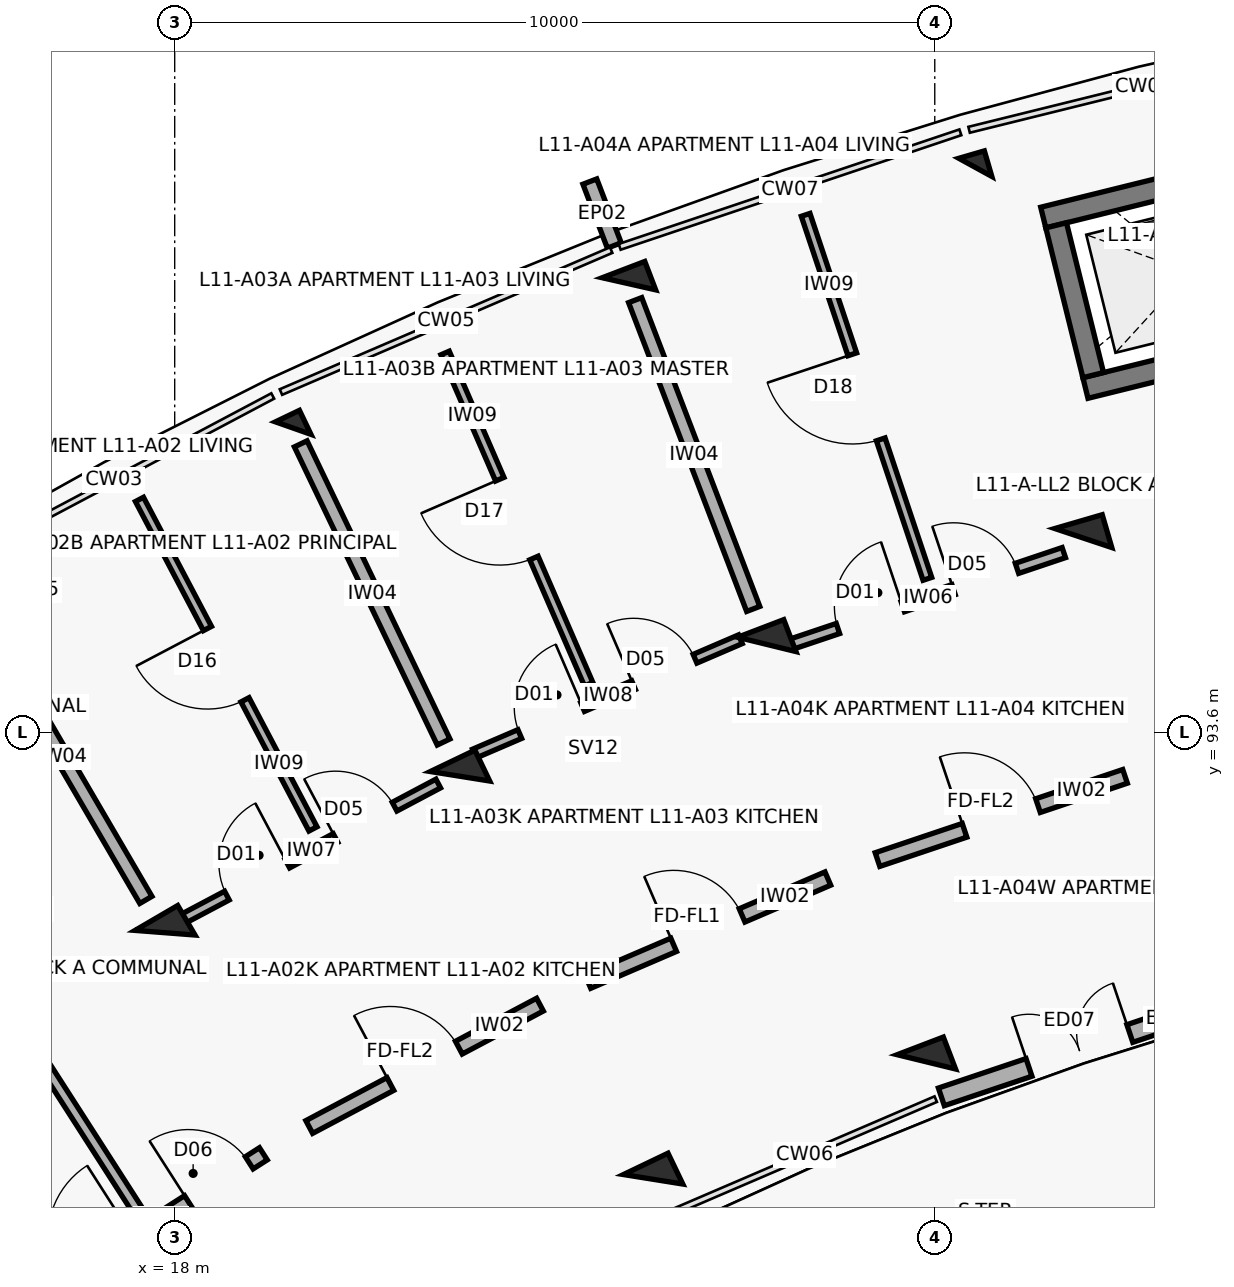
"""IFC4 building model, lengths in metres.
Left out: names, types, materials, properties, quantities, classifications, styles, units other than length and angle.
Written with IfcOpenShell. Run it as: python <this file> out.ifc"""

import sys

from ifc_helpers import new_model, si_unit, direction, frame, frame_2d, origin, origin_2d, place, context, subcontext, project, spatial, rectangle, extrude, element, fill, save


model = new_model("IFC4")
c1 = context("Model", 3, precision=1e-05, world=origin(), true_north=direction((0.0, 1.0)))
c2 = subcontext(c1, "Body", "Model", "MODEL_VIEW")
j1 = project(units=[si_unit("LENGTHUNIT", "METRE"), si_unit("PLANEANGLEUNIT", "RADIAN")], contexts=[c1])
p1 = place(None, origin())
s1 = spatial("IfcSite", under=j1, at=p1, CompositionType="ELEMENT")
p2 = place(p1, origin())
s2 = spatial("IfcBuilding", under=s1, at=p2, CompositionType="ELEMENT")
p3 = place(p2, frame((0.0, 0.0, 36.0)))
s3 = spatial("IfcBuildingStorey", under=s2, at=p3, CompositionType="ELEMENT", Elevation=36.0)
for number, where, z_axis, x_axis in (
    (1, (17.873, 90.96, 0.0), (0.0, 0.0, 1.0), (-0.504, 0.864, 0.0)),
    (2, (24.294, 87.716, 0.0), (0.0, 0.0, 1.0), (-0.432, 0.902, 0.0)),
    (3, (21.754, 93.019, 0.0), (0.0, 0.0, 1.0), (-0.432, 0.902, 0.0)),
):
    element("IfcColumn", number, at=place(p3, frame(where, z_axis=z_axis, x_axis=x_axis)), inside=s3, PredefinedType="COLUMN", context=c2, shape_type="SweptSolid", body=[
        extrude(rectangle(XDim=0.45, YDim=0.65, at=origin_2d()), origin(), (0.0, 0.0, 1.0), 3.1),
    ])
p4 = place(p3, frame((19.559, 97.6, 0.0), z_axis=(0.0, 0.0, 1.0), x_axis=(-0.432085748802, 0.901832526405, 0.0)))
e4 = element("IfcColumn", 4, at=p4, inside=s3, PredefinedType="COLUMN", context=c2, shape_type="SweptSolid", body=[
    extrude(rectangle(XDim=0.35, YDim=0.35, at=origin_2d()), origin(), (0.0, 0.0, 1.0), 3.1),
])
for number, where, z_axis, x_axis in (
    (5, (27.889, 89.261, 0.0), (0.0, 0.0, 1.0), (-0.357, 0.934, 0.0)),
    (6, (25.79, 94.753, 0.0), (0.0, 0.0, 1.0), (-0.357, 0.934, 0.0)),
):
    element("IfcColumn", number, at=place(p3, frame(where, z_axis=z_axis, x_axis=x_axis)), inside=s3, PredefinedType="COLUMN", context=c2, shape_type="SweptSolid", body=[
        extrude(rectangle(XDim=0.45, YDim=0.65, at=origin_2d()), origin(), (0.0, 0.0, 1.0), 3.1),
    ])
p5 = place(p3, frame((23.976, 99.499, 0.0), z_axis=(0.0, 0.0, 1.0), x_axis=(-0.357064076459, 0.934079892355, 0.0)))
e7 = element("IfcColumn", 7, at=p5, inside=s3, PredefinedType="COLUMN", context=c2, shape_type="SweptSolid", body=[
    extrude(rectangle(XDim=0.4, YDim=0.6, at=origin_2d()), origin(), (0.0, 0.0, 1.0), 3.1),
])
p6 = place(p3, frame((29.954, 96.153, 0.0), z_axis=(0.0, 0.0, 1.0), x_axis=(-0.27966144946, 0.96009867914, 0.0)))
e8 = element("IfcColumn", 8, at=p6, inside=s3, PredefinedType="COLUMN", context=c2, shape_type="SweptSolid", body=[
    extrude(rectangle(XDim=0.45, YDim=0.65, at=origin_2d()), origin(), (0.0, 0.0, 1.0), 3.1),
])
p7 = place(p3, frame((28.533, 101.031, 0.0), z_axis=(0.0, 0.0, 1.0), x_axis=(-0.27966144946, 0.96009867914, 0.0)))
e9 = element("IfcColumn", 9, at=p7, inside=s3, PredefinedType="COLUMN", context=c2, shape_type="SweptSolid", body=[
    extrude(rectangle(XDim=0.35, YDim=0.35, at=origin_2d()), origin(), (0.0, 0.0, 1.0), 3.1),
])
p8 = place(p3, frame((23.783, 100.003, 0.0), z_axis=(0.0, 0.0, 1.0), x_axis=(-0.356942580168, 0.934126326823, 0.0)))
e10 = element("IfcWall", 10, at=p8, inside=s3, PredefinedType="PARAPET", context=c2, shape_type="SweptSolid", body=[
    extrude(rectangle(XDim=0.9, YDim=0.195, at=frame_2d((0.45, 0.0))), origin(), (0.0, 0.0, 1.0), 2.25),
])
p9 = place(p3, frame((28.087, 88.801, 0.0), z_axis=(0.0, 0.0, 1.0), x_axis=(0.947890376231, 0.318596664529, 0.0)))
e11 = element("IfcWall", 11, at=p9, inside=s3, PredefinedType="SOLIDWALL", context=c2, shape_type="SweptSolid", body=[
    extrude(rectangle(XDim=3.832, YDim=0.245, at=frame_2d((1.916, 0.0))), origin(), (0.0, 0.0, 1.0), 2.25),
])
p10 = place(p9, frame((1.216, 0.0, 0.0)))
e12 = element("IfcOpeningElement", 12, at=p10, cuts=e11, PredefinedType="OPENING", context=c2, shape_type="SweptSolid", body=[
    extrude(rectangle(XDim=1.4, YDim=2.15, at=frame_2d((0.7, 1.075))), frame((0.0, 0.133, 0.0), z_axis=(0.0, -1.0, 0.0), x_axis=(1.0, 0.0, 0.0)), (0.0, 0.0, 1.0), 0.265),
])
p11 = place(p3, frame((25.763, 84.65, 0.0), z_axis=(0.0, 0.0, 1.0), x_axis=(0.941178218484, 0.337910581443, 0.0)))
e13 = element("IfcWall", 13, at=p11, inside=s3, PredefinedType="PARAPET", context=c2, shape_type="SweptSolid", body=[
    extrude(rectangle(XDim=9.075, YDim=0.18, at=frame_2d((4.538, 0.0))), origin(), (0.0, 0.0, 1.0), 0.25),
])
p12 = place(p3, frame((33.273, 98.942, 0.0), z_axis=(0.0, 0.0, 1.0), x_axis=(-0.970707542441, -0.240264160972, 0.0)))
e14 = element("IfcWall", 14, at=p12, inside=s3, PredefinedType="SHEAR", context=c2, shape_type="SweptSolid", body=[
    extrude(rectangle(XDim=3.39, YDim=0.28, at=frame_2d((1.695, 0.0))), origin(), (0.0, 0.0, 1.0), 3.1),
])
p13 = place(p12, frame((1.095, 0.0, 0.0)))
e15 = element("IfcOpeningElement", 15, at=p13, cuts=e14, PredefinedType="OPENING", context=c2, shape_type="SweptSolid", body=[
    extrude(rectangle(XDim=1.2, YDim=2.15, at=frame_2d((0.6, 1.075))), frame((0.0, 0.15, 0.0), z_axis=(0.0, -1.0, 0.0), x_axis=(1.0, 0.0, 0.0)), (0.0, 0.0, 1.0), 0.3),
])
p14 = place(p3, frame((32.718, 101.185, 0.0), z_axis=(0.0, 0.0, 1.0), x_axis=(-0.970711699588, -0.240247364777, 0.0)))
e16 = element("IfcWall", 16, at=p14, inside=s3, PredefinedType="SHEAR", context=c2, shape_type="SweptSolid", body=[
    extrude(rectangle(XDim=3.39, YDim=0.28, at=frame_2d((1.695, 0.0))), origin(), (0.0, 0.0, 1.0), 3.1),
])
p15 = place(p3, frame((30.085, 98.297, 0.0), z_axis=(0.0, 0.0, 1.0), x_axis=(-0.2402993748, 0.970698825832, 0.0)))
e17 = element("IfcWall", 17, at=p15, inside=s3, PredefinedType="SHEAR", context=c2, shape_type="SweptSolid", body=[
    extrude(rectangle(XDim=2.03, YDim=0.28, at=frame_2d((1.015, 0.0))), origin(), (0.0, 0.0, 1.0), 3.1),
])
p16 = place(p3, frame((16.272, 86.199, 0.0), z_axis=(0.0, 0.0, 1.0), x_axis=(0.842257205985, 0.539075874963, 0.0)))
e18 = element("IfcWall", 18, at=p16, inside=s3, PredefinedType="SOLIDWALL", context=c2, shape_type="SweptSolid", body=[
    extrude(rectangle(XDim=3.436, YDim=0.19, at=frame_2d((1.718, 0.0))), origin(), (0.0, 0.0, 1.0), 2.08),
])
p17 = place(p16, frame((0.28, 0.0, 0.0)))
e19 = element("IfcOpeningElement", 19, at=p17, cuts=e18, PredefinedType="OPENING", context=c2, shape_type="SweptSolid", body=[
    extrude(rectangle(XDim=1.12, YDim=2.15, at=frame_2d((0.56, 1.075))), frame((0.0, 0.105, 0.0), z_axis=(0.0, -1.0, 0.0), x_axis=(1.0, 0.0, 0.0)), (0.0, 0.0, 1.0), 0.21),
])
p18 = place(p16, frame((2.266, 0.0, 0.0)))
e20 = element("IfcOpeningElement", 20, at=p18, cuts=e18, PredefinedType="OPENING", context=c2, shape_type="SweptSolid", body=[
    extrude(rectangle(XDim=0.95, YDim=2.1, at=frame_2d((0.475, 1.05))), frame((0.0, 0.105, 0.0), z_axis=(0.0, -1.0, 0.0), x_axis=(1.0, 0.0, 0.0)), (0.0, 0.0, 1.0), 0.21),
])
p19 = place(p3, frame((17.524, 87.288, 0.0), z_axis=(0.0, 0.0, 1.0), x_axis=(-0.540338452216, 0.841447774408, 0.0)))
e21 = element("IfcWall", 21, at=p19, inside=s3, PredefinedType="PARTITIONING", context=c2, shape_type="SweptSolid", body=[
    extrude(rectangle(XDim=7.95, YDim=0.14, at=frame_2d((3.975, 0.0))), origin(), (0.0, 0.0, 1.0), 2.08),
])
p20 = place(p19, frame((6.05, 0.0, 0.0)))
e22 = element("IfcOpeningElement", 22, at=p20, cuts=e21, PredefinedType="OPENING", context=c2, shape_type="SweptSolid", body=[
    extrude(rectangle(XDim=0.92, YDim=2.1, at=frame_2d((0.46, 1.05))), frame((0.0, 0.08, 0.0), z_axis=(0.0, -1.0, 0.0), x_axis=(1.0, 0.0, 0.0)), (0.0, 0.0, 1.0), 0.16),
])
p21 = place(p3, frame((19.77, 88.404, 0.0), z_axis=(0.0, 0.0, 1.0), x_axis=(0.883410853063, 0.468599258099, 0.0)))
e23 = element("IfcWall", 23, at=p21, inside=s3, PredefinedType="SOLIDWALL", context=c2, shape_type="SweptSolid", body=[
    extrude(rectangle(XDim=3.436, YDim=0.19, at=frame_2d((1.718, 0.0))), origin(), (0.0, 0.0, 1.0), 2.08),
])
p22 = place(p21, frame((1.208, 0.0, 0.0)))
e24 = element("IfcOpeningElement", 24, at=p22, cuts=e23, PredefinedType="OPENING", context=c2, shape_type="SweptSolid", body=[
    extrude(rectangle(XDim=1.02, YDim=2.15, at=frame_2d((0.51, 1.075))), frame((0.0, 0.105, 0.0), z_axis=(0.0, -1.0, 0.0), x_axis=(1.0, 0.0, 0.0)), (0.0, 0.0, 1.0), 0.21),
])
p23 = place(p3, frame((18.113, 91.144, 0.0), z_axis=(0.0, 0.0, 1.0), x_axis=(0.88341855112, 0.46858474531, 0.0)))
e25 = element("IfcWall", 25, at=p23, inside=s3, PredefinedType="PARTITIONING", context=c2, shape_type="SweptSolid", body=[
    extrude(rectangle(XDim=3.797, YDim=0.13, at=frame_2d((1.898, 0.0))), origin(), (0.0, 0.0, 1.0), 2.08),
])
p24 = place(p23, frame((0.65, 0.0, 0.0)))
e26 = element("IfcOpeningElement", 26, at=p24, cuts=e25, PredefinedType="OPENING", context=c2, shape_type="SweptSolid", body=[
    extrude(rectangle(XDim=0.9, YDim=2.1, at=frame_2d((0.45, 1.05))), frame((0.0, 0.075, 0.0), z_axis=(0.0, -1.0, 0.0), x_axis=(1.0, 0.0, 0.0)), (0.0, 0.0, 1.0), 0.15),
])
p25 = place(p23, frame((2.267, 0.0, 0.0)))
e27 = element("IfcOpeningElement", 27, at=p25, cuts=e25, PredefinedType="OPENING", context=c2, shape_type="SweptSolid", body=[
    extrude(rectangle(XDim=0.88, YDim=2.1, at=frame_2d((0.44, 1.05))), frame((0.0, 0.075, 0.0), z_axis=(0.0, -1.0, 0.0), x_axis=(1.0, 0.0, 0.0)), (0.0, 0.0, 1.0), 0.15),
])
p26 = place(p3, frame((19.819, 92.326, 0.0), z_axis=(0.0, 0.0, 1.0), x_axis=(-0.465849102717, 0.884864177995, 0.0)))
e28 = element("IfcWall", 28, at=p26, inside=s3, PredefinedType="PARTITIONING", context=c2, shape_type="SweptSolid", body=[
    extrude(rectangle(XDim=4.9, YDim=0.12, at=frame_2d((2.45, 0.0))), origin(), (0.0, 0.0, 1.0), 2.08),
])
p27 = place(p26, frame((1.92, 0.0, 0.0)))
e29 = element("IfcOpeningElement", 29, at=p27, cuts=e28, PredefinedType="OPENING", context=c2, shape_type="SweptSolid", body=[
    extrude(rectangle(XDim=1.06, YDim=2.1, at=frame_2d((0.53, 1.05))), frame((0.0, 0.07, 0.0), z_axis=(0.0, -1.0, 0.0), x_axis=(1.0, 0.0, 0.0)), (0.0, 0.0, 1.0), 0.14),
])
p28 = place(p3, frame((17.621, 91.392, 0.0), z_axis=(0.0, 0.0, 1.0), x_axis=(-0.504216452091, 0.863577309475, 0.0)))
e30 = element("IfcWall", 30, at=p28, inside=s3, PredefinedType="SOLIDWALL", context=c2, shape_type="SweptSolid", body=[
    extrude(rectangle(XDim=4.35, YDim=0.185, at=frame_2d((2.175, 0.0))), origin(), (0.0, 0.0, 1.0), 2.08),
])
p29 = place(p3, frame((23.437, 90.316, 0.0), z_axis=(0.0, 0.0, 1.0), x_axis=(0.918718172399, 0.394913813008, 0.0)))
e31 = element("IfcWall", 31, at=p29, inside=s3, PredefinedType="SOLIDWALL", context=c2, shape_type="SweptSolid", body=[
    extrude(rectangle(XDim=3.436, YDim=0.19, at=frame_2d((1.718, 0.0))), origin(), (0.0, 0.0, 1.0), 2.08),
])
p30 = place(p29, frame((1.228, 0.0, 0.0)))
e32 = element("IfcOpeningElement", 32, at=p30, cuts=e31, PredefinedType="OPENING", context=c2, shape_type="SweptSolid", body=[
    extrude(rectangle(XDim=0.98, YDim=2.15, at=frame_2d((0.49, 1.075))), frame((0.0, 0.105, 0.0), z_axis=(0.0, -1.0, 0.0), x_axis=(1.0, 0.0, 0.0)), (0.0, 0.0, 1.0), 0.21),
])
p31 = place(p3, frame((21.943, 93.317, 0.0), z_axis=(0.0, 0.0, 1.0), x_axis=(0.918726854017, 0.394893615684, 0.0)))
e33 = element("IfcWall", 33, at=p31, inside=s3, PredefinedType="PARTITIONING", context=c2, shape_type="SweptSolid", body=[
    extrude(rectangle(XDim=3.81, YDim=0.125, at=frame_2d((1.905, 0.0))), origin(), (0.0, 0.0, 1.0), 2.08),
])
p32 = place(p31, frame((0.65, 0.0, 0.0)))
e34 = element("IfcOpeningElement", 34, at=p32, cuts=e33, PredefinedType="OPENING", context=c2, shape_type="SweptSolid", body=[
    extrude(rectangle(XDim=0.9, YDim=2.1, at=frame_2d((0.45, 1.05))), frame((0.0, 0.073, 0.0), z_axis=(0.0, -1.0, 0.0), x_axis=(1.0, 0.0, 0.0)), (0.0, 0.0, 1.0), 0.145),
])
p33 = place(p31, frame((2.28, 0.0, 0.0)))
e35 = element("IfcOpeningElement", 35, at=p33, cuts=e33, PredefinedType="OPENING", context=c2, shape_type="SweptSolid", body=[
    extrude(rectangle(XDim=0.88, YDim=2.1, at=frame_2d((0.44, 1.05))), frame((0.0, 0.073, 0.0), z_axis=(0.0, -1.0, 0.0), x_axis=(1.0, 0.0, 0.0)), (0.0, 0.0, 1.0), 0.145),
])
p34 = place(p3, frame((23.446, 94.23, 0.0), z_axis=(0.0, 0.0, 1.0), x_axis=(-0.3976752315, 0.917526244993, 0.0)))
e36 = element("IfcWall", 36, at=p34, inside=s3, PredefinedType="PARTITIONING", context=c2, shape_type="SweptSolid", body=[
    extrude(rectangle(XDim=4.75, YDim=0.12, at=frame_2d((2.375, 0.0))), origin(), (0.0, 0.0, 1.0), 2.08),
])
p35 = place(p34, frame((1.81, 0.0, 0.0)))
e37 = element("IfcOpeningElement", 37, at=p35, cuts=e36, PredefinedType="OPENING", context=c2, shape_type="SweptSolid", body=[
    extrude(rectangle(XDim=1.13, YDim=2.1, at=frame_2d((0.565, 1.05))), frame((0.0, 0.07, 0.0), z_axis=(0.0, -1.0, 0.0), x_axis=(1.0, 0.0, 0.0)), (0.0, 0.0, 1.0), 0.14),
])
p36 = place(p3, frame((21.538, 93.469, 0.0), z_axis=(0.0, 0.0, 1.0), x_axis=(-0.432086898897, 0.901831975371, 0.0)))
e38 = element("IfcWall", 38, at=p36, inside=s3, PredefinedType="SOLIDWALL", context=c2, shape_type="SweptSolid", body=[
    extrude(rectangle(XDim=4.35, YDim=0.185, at=frame_2d((2.175, 0.0))), origin(), (0.0, 0.0, 1.0), 2.08),
])
p37 = place(p3, frame((27.247, 91.923, 0.0), z_axis=(0.0, 0.0, 1.0), x_axis=(0.947863007629, 0.318678080151, 0.0)))
e39 = element("IfcWall", 39, at=p37, inside=s3, PredefinedType="SOLIDWALL", context=c2, shape_type="SweptSolid", body=[
    extrude(rectangle(XDim=3.436, YDim=0.19, at=frame_2d((1.718, 0.0))), origin(), (0.0, 0.0, 1.0), 2.08),
])
p38 = place(p37, frame((1.208, 0.0, 0.0)))
e40 = element("IfcOpeningElement", 40, at=p38, cuts=e39, PredefinedType="OPENING", context=c2, shape_type="SweptSolid", body=[
    extrude(rectangle(XDim=1.02, YDim=2.15, at=frame_2d((0.51, 1.075))), frame((0.0, 0.105, 0.0), z_axis=(0.0, -1.0, 0.0), x_axis=(1.0, 0.0, 0.0)), (0.0, 0.0, 1.0), 0.21),
])
p39 = place(p3, frame((26.11, 94.756, 0.0), z_axis=(0.0, 0.0, 1.0), x_axis=(0.947873924847, 0.318645606584, 0.0)))
e41 = element("IfcWall", 41, at=p39, inside=s3, PredefinedType="PARTITIONING", context=c2, shape_type="SweptSolid", body=[
    extrude(rectangle(XDim=3.785, YDim=0.14, at=frame_2d((1.893, 0.0))), origin(), (0.0, 0.0, 1.0), 2.08),
])
p40 = place(p39, frame((0.65, 0.0, 0.0)))
e42 = element("IfcOpeningElement", 42, at=p40, cuts=e41, PredefinedType="OPENING", context=c2, shape_type="SweptSolid", body=[
    extrude(rectangle(XDim=0.9, YDim=2.1, at=frame_2d((0.45, 1.05))), frame((0.0, 0.08, 0.0), z_axis=(0.0, -1.0, 0.0), x_axis=(1.0, 0.0, 0.0)), (0.0, 0.0, 1.0), 0.16),
])
p41 = place(p39, frame((2.255, 0.0, 0.0)))
e43 = element("IfcOpeningElement", 43, at=p41, cuts=e41, PredefinedType="OPENING", context=c2, shape_type="SweptSolid", body=[
    extrude(rectangle(XDim=0.88, YDim=2.1, at=frame_2d((0.44, 1.05))), frame((0.0, 0.08, 0.0), z_axis=(0.0, -1.0, 0.0), x_axis=(1.0, 0.0, 0.0)), (0.0, 0.0, 1.0), 0.16),
])
p42 = place(p3, frame((27.903, 95.616, 0.0), z_axis=(0.0, 0.0, 1.0), x_axis=(-0.31722829501, 0.948349201953, 0.0)))
e44 = element("IfcWall", 44, at=p42, inside=s3, PredefinedType="PARTITIONING", context=c2, shape_type="SweptSolid", body=[
    extrude(rectangle(XDim=5.05, YDim=0.12, at=frame_2d((2.525, 0.0))), origin(), (0.0, 0.0, 1.0), 2.08),
])
p43 = place(p42, frame((1.935, 0.0, 0.0)))
e45 = element("IfcOpeningElement", 45, at=p43, cuts=e44, PredefinedType="OPENING", context=c2, shape_type="SweptSolid", body=[
    extrude(rectangle(XDim=1.18, YDim=2.1, at=frame_2d((0.59, 1.05))), frame((0.0, 0.07, 0.0), z_axis=(0.0, -1.0, 0.0), x_axis=(1.0, 0.0, 0.0)), (0.0, 0.0, 1.0), 0.14),
])
p44 = place(p3, frame((25.611, 95.22, 0.0), z_axis=(0.0, 0.0, 1.0), x_axis=(-0.357064016205, 0.934079915388, 0.0)))
e46 = element("IfcWall", 46, at=p44, inside=s3, PredefinedType="SOLIDWALL", context=c2, shape_type="SweptSolid", body=[
    extrude(rectangle(XDim=4.35, YDim=0.185, at=frame_2d((2.175, 0.0))), origin(), (0.0, 0.0, 1.0), 2.08),
])
p45 = place(p10, origin())
e47 = element("IfcDoor", 47, at=p45, inside=s3, OperationType="DOUBLE_DOOR_SINGLE_SWING", PredefinedType="DOOR", context=c2, shape_type="SweptSolid", body=[
    extrude(rectangle(XDim=1.4, YDim=2.15, at=frame_2d((0.7, 1.075))), frame((0.0, 0.025, 0.0), z_axis=(0.0, -1.0, 0.0), x_axis=(1.0, 0.0, 0.0)), (0.0, 0.0, 1.0), 0.05),
])
fill(e12, e47)
p46 = place(p18, origin())
e48 = element("IfcDoor", 48, at=p46, inside=s3, OperationType="SINGLE_SWING_LEFT", PredefinedType="DOOR", context=c2, shape_type="SweptSolid", body=[
    extrude(rectangle(XDim=0.95, YDim=2.1, at=frame_2d((0.475, 1.05))), frame((0.0, 0.025, 0.0), z_axis=(0.0, -1.0, 0.0), x_axis=(1.0, 0.0, 0.0)), (0.0, 0.0, 1.0), 0.05),
])
fill(e20, e48)
p47 = place(p22, origin())
e49 = element("IfcDoor", 49, at=p47, inside=s3, OperationType="SINGLE_SWING_LEFT", PredefinedType="DOOR", context=c2, shape_type="SweptSolid", body=[
    extrude(rectangle(XDim=1.02, YDim=2.15, at=frame_2d((0.51, 1.075))), frame((0.0, 0.025, 0.0), z_axis=(0.0, -1.0, 0.0), x_axis=(1.0, 0.0, 0.0)), (0.0, 0.0, 1.0), 0.05),
])
fill(e24, e49)
p48 = place(p24, origin())
e50 = element("IfcDoor", 50, at=p48, inside=s3, OperationType="SINGLE_SWING_RIGHT", PredefinedType="DOOR", context=c2, shape_type="SweptSolid", body=[
    extrude(rectangle(XDim=0.9, YDim=2.1, at=frame_2d((0.45, 1.05))), frame((0.0, 0.025, 0.0), z_axis=(0.0, -1.0, 0.0), x_axis=(1.0, 0.0, 0.0)), (0.0, 0.0, 1.0), 0.05),
])
fill(e26, e50)
p49 = place(p25, origin())
e51 = element("IfcDoor", 51, at=p49, inside=s3, OperationType="SINGLE_SWING_LEFT", PredefinedType="DOOR", context=c2, shape_type="SweptSolid", body=[
    extrude(rectangle(XDim=0.88, YDim=2.1, at=frame_2d((0.44, 1.05))), frame((0.0, 0.025, 0.0), z_axis=(0.0, -1.0, 0.0), x_axis=(1.0, 0.0, 0.0)), (0.0, 0.0, 1.0), 0.05),
])
fill(e27, e51)
p50 = place(p27, origin())
e52 = element("IfcDoor", 52, at=p50, inside=s3, OperationType="SINGLE_SWING_RIGHT", PredefinedType="DOOR", context=c2, shape_type="SweptSolid", body=[
    extrude(rectangle(XDim=1.06, YDim=2.1, at=frame_2d((0.53, 1.05))), frame((0.0, 0.025, 0.0), z_axis=(0.0, -1.0, 0.0), x_axis=(1.0, 0.0, 0.0)), (0.0, 0.0, 1.0), 0.05),
])
fill(e29, e52)
p51 = place(p30, origin())
e53 = element("IfcDoor", 53, at=p51, inside=s3, OperationType="SINGLE_SWING_LEFT", PredefinedType="DOOR", context=c2, shape_type="SweptSolid", body=[
    extrude(rectangle(XDim=0.98, YDim=2.15, at=frame_2d((0.49, 1.075))), frame((0.0, 0.025, 0.0), z_axis=(0.0, -1.0, 0.0), x_axis=(1.0, 0.0, 0.0)), (0.0, 0.0, 1.0), 0.05),
])
fill(e32, e53)
p52 = place(p32, origin())
e54 = element("IfcDoor", 54, at=p52, inside=s3, OperationType="SINGLE_SWING_RIGHT", PredefinedType="DOOR", context=c2, shape_type="SweptSolid", body=[
    extrude(rectangle(XDim=0.9, YDim=2.1, at=frame_2d((0.45, 1.05))), frame((0.0, 0.025, 0.0), z_axis=(0.0, -1.0, 0.0), x_axis=(1.0, 0.0, 0.0)), (0.0, 0.0, 1.0), 0.05),
])
fill(e34, e54)
p53 = place(p33, origin())
e55 = element("IfcDoor", 55, at=p53, inside=s3, OperationType="SINGLE_SWING_LEFT", PredefinedType="DOOR", context=c2, shape_type="SweptSolid", body=[
    extrude(rectangle(XDim=0.88, YDim=2.1, at=frame_2d((0.44, 1.05))), frame((0.0, 0.025, 0.0), z_axis=(0.0, -1.0, 0.0), x_axis=(1.0, 0.0, 0.0)), (0.0, 0.0, 1.0), 0.05),
])
fill(e35, e55)
p54 = place(p35, origin())
e56 = element("IfcDoor", 56, at=p54, inside=s3, OperationType="SINGLE_SWING_RIGHT", PredefinedType="DOOR", context=c2, shape_type="SweptSolid", body=[
    extrude(rectangle(XDim=1.13, YDim=2.1, at=frame_2d((0.565, 1.05))), frame((0.0, 0.025, 0.0), z_axis=(0.0, -1.0, 0.0), x_axis=(1.0, 0.0, 0.0)), (0.0, 0.0, 1.0), 0.05),
])
fill(e37, e56)
p55 = place(p38, origin())
e57 = element("IfcDoor", 57, at=p55, inside=s3, OperationType="SINGLE_SWING_LEFT", PredefinedType="DOOR", context=c2, shape_type="SweptSolid", body=[
    extrude(rectangle(XDim=1.02, YDim=2.15, at=frame_2d((0.51, 1.075))), frame((0.0, 0.025, 0.0), z_axis=(0.0, -1.0, 0.0), x_axis=(1.0, 0.0, 0.0)), (0.0, 0.0, 1.0), 0.05),
])
fill(e40, e57)
p56 = place(p40, origin())
e58 = element("IfcDoor", 58, at=p56, inside=s3, OperationType="SINGLE_SWING_RIGHT", PredefinedType="DOOR", context=c2, shape_type="SweptSolid", body=[
    extrude(rectangle(XDim=0.9, YDim=2.1, at=frame_2d((0.45, 1.05))), frame((0.0, 0.025, 0.0), z_axis=(0.0, -1.0, 0.0), x_axis=(1.0, 0.0, 0.0)), (0.0, 0.0, 1.0), 0.05),
])
fill(e42, e58)
p57 = place(p41, origin())
e59 = element("IfcDoor", 59, at=p57, inside=s3, OperationType="SINGLE_SWING_LEFT", PredefinedType="DOOR", context=c2, shape_type="SweptSolid", body=[
    extrude(rectangle(XDim=0.88, YDim=2.1, at=frame_2d((0.44, 1.05))), frame((0.0, 0.025, 0.0), z_axis=(0.0, -1.0, 0.0), x_axis=(1.0, 0.0, 0.0)), (0.0, 0.0, 1.0), 0.05),
])
fill(e43, e59)
p58 = place(p43, origin())
e60 = element("IfcDoor", 60, at=p58, inside=s3, OperationType="SINGLE_SWING_RIGHT", PredefinedType="DOOR", context=c2, shape_type="SweptSolid", body=[
    extrude(rectangle(XDim=1.18, YDim=2.1, at=frame_2d((0.59, 1.05))), frame((0.0, 0.025, 0.0), z_axis=(0.0, -1.0, 0.0), x_axis=(1.0, 0.0, 0.0)), (0.0, 0.0, 1.0), 0.05),
])
fill(e45, e60)
save(model, sys.argv[1])
